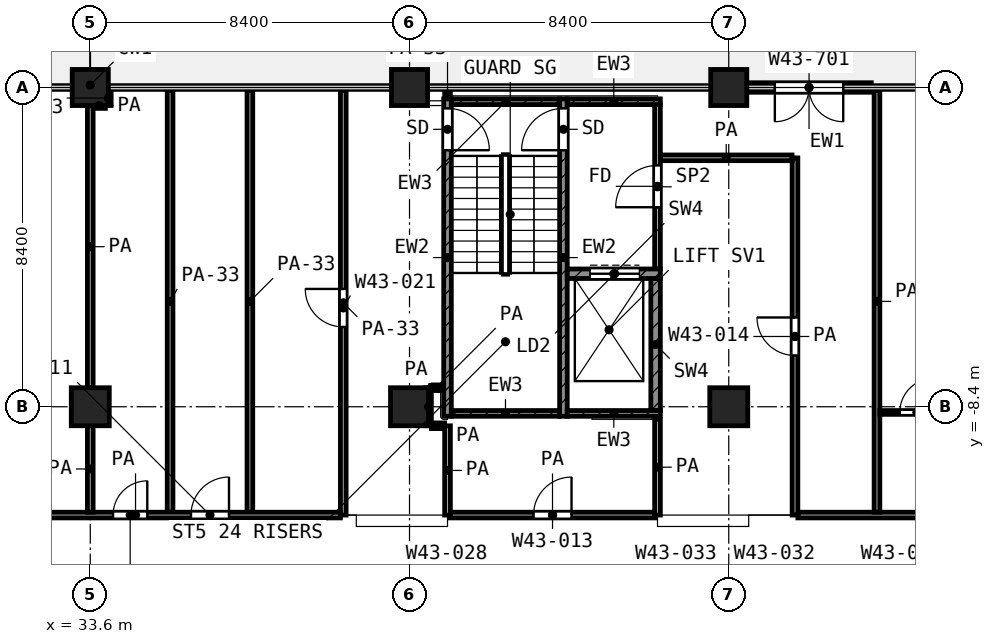
"""IFC4 building model, lengths in metres.
Left out: names, types, materials, properties, quantities, classifications, styles, units other than length and angle.
Written with IfcOpenShell. Run it as: python <this file> out.ifc"""

import sys

from ifc_helpers import new_model, si_unit, direction, frame, frame_2d, origin, origin_2d, place, context, subcontext, project, spatial, rectangle, extrude, element, fill, save


model = new_model("IFC4")
c1 = context("Model", 3, precision=1e-05, world=origin(), true_north=direction((0.0, 1.0)))
c2 = subcontext(c1, "Body", "Model", "MODEL_VIEW")
j1 = project(units=[si_unit("LENGTHUNIT", "METRE"), si_unit("PLANEANGLEUNIT", "RADIAN")], contexts=[c1])
p1 = place(None, origin())
s1 = spatial("IfcSite", under=j1, at=p1, CompositionType="ELEMENT")
p2 = place(p1, origin())
s2 = spatial("IfcBuilding", under=s1, at=p2, CompositionType="ELEMENT")
p3 = place(p2, frame((0.0, 0.0, 187.8)))
s3 = spatial("IfcBuildingStorey", under=s2, at=p3, CompositionType="ELEMENT", Elevation=187.8)
for number, where, z_axis, x_axis in (
    (1, (33.6, 0.0, 0.0), (0.0, 0.0, 1.0), (1.0, 0.0, 0.0)),
    (2, (42.0, 0.0, 0.0), (0.0, 0.0, 1.0), (1.0, 0.0, 0.0)),
    (3, (50.4, 0.0, 0.0), (0.0, 0.0, 1.0), (1.0, 0.0, 0.0)),
):
    element("IfcColumn", number, at=place(p3, frame(where, z_axis=z_axis, x_axis=x_axis)), inside=s3, PredefinedType="COLUMN", context=c2, shape_type="SweptSolid", body=[
        extrude(rectangle(XDim=0.95, YDim=0.95, at=origin_2d()), origin(), (0.0, 0.0, 1.0), 4.2),
    ])
for number, where, z_axis, x_axis in (
    (4, (33.6, -8.4, 0.0), (0.0, 0.0, 1.0), (1.0, 0.0, 0.0)),
    (5, (42.0, -8.4, 0.0), (0.0, 0.0, 1.0), (1.0, 0.0, 0.0)),
    (6, (50.4, -8.4, 0.0), (0.0, 0.0, 1.0), (1.0, 0.0, 0.0)),
):
    element("IfcColumn", number, at=place(p3, frame(where, z_axis=z_axis, x_axis=x_axis)), inside=s3, PredefinedType="COLUMN", context=c2, shape_type="SweptSolid", body=[
        extrude(rectangle(XDim=1.0, YDim=1.0, at=origin_2d()), origin(), (0.0, 0.0, 1.0), 4.2),
    ])
p4 = place(p3, frame((54.15, 0.0, 0.0), z_axis=(0.0, 0.0, 1.0), x_axis=(-1.0, 0.0, 0.0)))
e7 = element("IfcWall", 7, at=p4, inside=s3, PredefinedType="SOLIDWALL", context=c2, shape_type="SweptSolid", body=[
    extrude(rectangle(XDim=3.275, YDim=0.25, at=frame_2d((1.637, 0.0))), origin(), (0.0, 0.0, 1.0), 2.58),
])
p5 = place(p4, frame((0.738, 0.0, 0.0)))
e8 = element("IfcOpeningElement", 8, at=p5, cuts=e7, PredefinedType="OPENING", context=c2, shape_type="SweptSolid", body=[
    extrude(rectangle(XDim=1.8, YDim=2.1, at=frame_2d((0.9, 1.05))), frame((0.0, 0.135, 0.0), z_axis=(0.0, -1.0, 0.0), x_axis=(1.0, 0.0, 0.0)), (0.0, 0.0, 1.0), 0.27),
])
p6 = place(p3, frame((43.0, -8.65, 0.0), z_axis=(0.0, 0.0, 1.0), x_axis=(0.0, 1.0, 0.0)))
e9 = element("IfcWall", 9, at=p6, inside=s3, PredefinedType="SHEAR", context=c2, shape_type="SweptSolid", body=[
    extrude(rectangle(XDim=8.35, YDim=0.2, at=frame_2d((4.175, 0.0))), origin(), (0.0, 0.0, 1.0), 3.6),
])
p7 = place(p6, frame((7.0, 0.0, 0.0)))
e10 = element("IfcOpeningElement", 10, at=p7, cuts=e9, PredefinedType="OPENING", context=c2, shape_type="SweptSolid", body=[
    extrude(rectangle(XDim=1.1, YDim=2.1, at=frame_2d((0.55, 1.05))), frame((0.0, 0.11, 0.0), z_axis=(0.0, -1.0, 0.0), x_axis=(1.0, 0.0, 0.0)), (0.0, 0.0, 1.0), 0.22),
])
p8 = place(p3, frame((46.05, -8.65, 0.0), z_axis=(0.0, 0.0, 1.0), x_axis=(0.0, 1.0, 0.0)))
e11 = element("IfcWall", 11, at=p8, inside=s3, PredefinedType="SHEAR", context=c2, shape_type="SweptSolid", body=[
    extrude(rectangle(XDim=8.35, YDim=0.2, at=frame_2d((4.175, 0.0))), origin(), (0.0, 0.0, 1.0), 3.6),
])
p9 = place(p8, frame((7.0, 0.0, 0.0)))
e12 = element("IfcOpeningElement", 12, at=p9, cuts=e11, PredefinedType="OPENING", context=c2, shape_type="SweptSolid", body=[
    extrude(rectangle(XDim=1.1, YDim=2.1, at=frame_2d((0.55, 1.05))), frame((0.0, 0.11, 0.0), z_axis=(0.0, -1.0, 0.0), x_axis=(1.0, 0.0, 0.0)), (0.0, 0.0, 1.0), 0.22),
])
p10 = place(p3, frame((43.1, -0.375, 0.0), z_axis=(0.0, 0.0, 1.0), x_axis=(1.0, 0.0, 0.0)))
e13 = element("IfcWall", 13, at=p10, inside=s3, PredefinedType="SHEAR", context=c2, shape_type="SweptSolid", body=[
    extrude(rectangle(XDim=2.85, YDim=0.15, at=frame_2d((1.425, 0.0))), origin(), (0.0, 0.0, 1.0), 3.6),
])
p11 = place(p3, frame((46.15, -0.375, 0.0), z_axis=(0.0, 0.0, 1.0), x_axis=(1.0, 0.0, 0.0)))
e14 = element("IfcWall", 14, at=p11, inside=s3, PredefinedType="SHEAR", context=c2, shape_type="SweptSolid", body=[
    extrude(rectangle(XDim=2.45, YDim=0.15, at=frame_2d((1.225, 0.0))), origin(), (0.0, 0.0, 1.0), 3.6),
])
p12 = place(p3, frame((43.1, -8.575, 0.0), z_axis=(0.0, 0.0, 1.0), x_axis=(1.0, 0.0, 0.0)))
e15 = element("IfcWall", 15, at=p12, inside=s3, PredefinedType="SHEAR", context=c2, shape_type="SweptSolid", body=[
    extrude(rectangle(XDim=2.85, YDim=0.15, at=frame_2d((1.425, 0.0))), origin(), (0.0, 0.0, 1.0), 3.6),
])
p13 = place(p3, frame((46.15, -8.575, 0.0), z_axis=(0.0, 0.0, 1.0), x_axis=(1.0, 0.0, 0.0)))
e16 = element("IfcWall", 16, at=p13, inside=s3, PredefinedType="SHEAR", context=c2, shape_type="SweptSolid", body=[
    extrude(rectangle(XDim=2.45, YDim=0.15, at=frame_2d((1.225, 0.0))), origin(), (0.0, 0.0, 1.0), 3.6),
])
p14 = place(p3, frame((46.15, -4.9, 0.0), z_axis=(0.0, 0.0, 1.0), x_axis=(1.0, 0.0, 0.0)))
e17 = element("IfcWall", 17, at=p14, inside=s3, PredefinedType="SHEAR", context=c2, shape_type="SweptSolid", body=[
    extrude(rectangle(XDim=2.45, YDim=0.25, at=frame_2d((1.225, 0.0))), origin(), (0.0, 0.0, 1.0), 3.6),
])
p15 = place(p14, frame((0.6, 0.0, 0.0)))
e18 = element("IfcOpeningElement", 18, at=p15, cuts=e17, PredefinedType="OPENING", context=c2, shape_type="SweptSolid", body=[
    extrude(rectangle(XDim=1.3, YDim=2.1, at=frame_2d((0.65, 1.05))), frame((0.0, 0.135, 0.0), z_axis=(0.0, -1.0, 0.0), x_axis=(1.0, 0.0, 0.0)), (0.0, 0.0, 1.0), 0.27),
])
p16 = place(p3, frame((48.475, -8.5, 0.0), z_axis=(0.0, 0.0, 1.0), x_axis=(0.0, 1.0, 0.0)))
e19 = element("IfcWall", 19, at=p16, inside=s3, PredefinedType="SHEAR", context=c2, shape_type="SweptSolid", body=[
    extrude(rectangle(XDim=3.475, YDim=0.25, at=frame_2d((1.738, 0.0))), origin(), (0.0, 0.0, 1.0), 3.6),
])
p17 = place(p3, frame((48.525, -4.775, 0.0), z_axis=(0.0, 0.0, 1.0), x_axis=(0.0, 1.0, 0.0)))
e20 = element("IfcWall", 20, at=p17, inside=s3, PredefinedType="PARTITIONING", context=c2, shape_type="SweptSolid", body=[
    extrude(rectangle(XDim=4.325, YDim=0.15, at=frame_2d((2.163, 0.0))), origin(), (0.0, 0.0, 1.0), 3.6),
])
p18 = place(p17, frame((1.625, 0.0, 0.0)))
e21 = element("IfcOpeningElement", 21, at=p18, cuts=e20, PredefinedType="OPENING", context=c2, shape_type="SweptSolid", body=[
    extrude(rectangle(XDim=1.1, YDim=2.1, at=frame_2d((0.55, 1.05))), frame((0.0, 0.085, 0.0), z_axis=(0.0, -1.0, 0.0), x_axis=(1.0, 0.0, 0.0)), (0.0, 0.0, 1.0), 0.17),
])
p19 = place(p3, frame((54.375, -8.55, 0.0), z_axis=(0.0, 0.0, 1.0), x_axis=(1.0, 0.0, 0.0)))
e22 = element("IfcWall", 22, at=p19, inside=s3, PredefinedType="PARTITIONING", context=c2, shape_type="SweptSolid", body=[
    extrude(rectangle(XDim=1.975, YDim=0.1, at=frame_2d((0.988, 0.0))), origin(), (0.0, 0.0, 1.0), 3.6),
])
p20 = place(p19, frame((0.525, 0.0, 0.0)))
e23 = element("IfcOpeningElement", 23, at=p20, cuts=e22, PredefinedType="OPENING", context=c2, shape_type="SweptSolid", body=[
    extrude(rectangle(XDim=0.9, YDim=2.1, at=frame_2d((0.45, 1.05))), frame((0.0, 0.06, 0.0), z_axis=(0.0, -1.0, 0.0), x_axis=(1.0, 0.0, 0.0)), (0.0, 0.0, 1.0), 0.12),
])
p21 = place(p3, frame((29.4, -11.25, 0.0), z_axis=(0.0, 0.0, 1.0), x_axis=(1.0, 0.0, 0.0)))
e24 = element("IfcWall", 24, at=p21, inside=s3, PredefinedType="PARTITIONING", context=c2, shape_type="SweptSolid", body=[
    extrude(rectangle(XDim=10.782, YDim=0.15, at=frame_2d((5.391, 0.0))), origin(), (0.0, 0.0, 1.0), 3.6),
])
p22 = place(p21, frame((1.6, 0.0, 0.0)))
e25 = element("IfcOpeningElement", 25, at=p22, cuts=e24, PredefinedType="OPENING", context=c2, shape_type="SweptSolid", body=[
    extrude(rectangle(XDim=1.0, YDim=2.1, at=frame_2d((0.5, 1.05))), frame((0.0, 0.085, 0.0), z_axis=(0.0, -1.0, 0.0), x_axis=(1.0, 0.0, 0.0)), (0.0, 0.0, 1.0), 0.17),
])
p23 = place(p21, frame((4.8, 0.0, 0.0)))
e26 = element("IfcOpeningElement", 26, at=p23, cuts=e24, PredefinedType="OPENING", context=c2, shape_type="SweptSolid", body=[
    extrude(rectangle(XDim=0.9, YDim=2.1, at=frame_2d((0.45, 1.05))), frame((0.0, 0.085, 0.0), z_axis=(0.0, -1.0, 0.0), x_axis=(1.0, 0.0, 0.0)), (0.0, 0.0, 1.0), 0.17),
])
p24 = place(p21, frame((6.85, 0.0, 0.0)))
e27 = element("IfcOpeningElement", 27, at=p24, cuts=e24, PredefinedType="OPENING", context=c2, shape_type="SweptSolid", body=[
    extrude(rectangle(XDim=1.0, YDim=2.1, at=frame_2d((0.5, 1.05))), frame((0.0, 0.085, 0.0), z_axis=(0.0, -1.0, 0.0), x_axis=(1.0, 0.0, 0.0)), (0.0, 0.0, 1.0), 0.17),
])
p25 = place(p3, frame((43.075, -11.25, 0.0), z_axis=(0.0, 0.0, 1.0), x_axis=(1.0, 0.0, 0.0)))
e28 = element("IfcWall", 28, at=p25, inside=s3, PredefinedType="PARTITIONING", context=c2, shape_type="SweptSolid", body=[
    extrude(rectangle(XDim=5.375, YDim=0.15, at=frame_2d((2.688, 0.0))), origin(), (0.0, 0.0, 1.0), 3.6),
])
p26 = place(p25, frame((2.188, 0.0, 0.0)))
e29 = element("IfcOpeningElement", 29, at=p26, cuts=e28, PredefinedType="OPENING", context=c2, shape_type="SweptSolid", body=[
    extrude(rectangle(XDim=1.0, YDim=2.1, at=frame_2d((0.5, 1.05))), frame((0.0, 0.085, 0.0), z_axis=(0.0, -1.0, 0.0), x_axis=(1.0, 0.0, 0.0)), (0.0, 0.0, 1.0), 0.17),
])
p27 = place(p3, frame((52.218, -11.25, 0.0), z_axis=(0.0, 0.0, 1.0), x_axis=(1.0, 0.0, 0.0)))
e30 = element("IfcWall", 30, at=p27, inside=s3, PredefinedType="PARTITIONING", context=c2, shape_type="SweptSolid", body=[
    extrude(rectangle(XDim=14.902, YDim=0.15, at=frame_2d((7.451, 0.0))), origin(), (0.0, 0.0, 1.0), 3.6),
])
p28 = place(p27, frame((4.782, 0.0, 0.0)))
e31 = element("IfcOpeningElement", 31, at=p28, cuts=e30, PredefinedType="OPENING", context=c2, shape_type="SweptSolid", body=[
    extrude(rectangle(XDim=1.2, YDim=2.1, at=frame_2d((0.6, 1.05))), frame((0.0, 0.085, 0.0), z_axis=(0.0, -1.0, 0.0), x_axis=(1.0, 0.0, 0.0)), (0.0, 0.0, 1.0), 0.17),
])
p29 = place(p27, frame((6.382, 0.0, 0.0)))
e32 = element("IfcOpeningElement", 32, at=p29, cuts=e30, PredefinedType="OPENING", context=c2, shape_type="SweptSolid", body=[
    extrude(rectangle(XDim=1.2, YDim=2.1, at=frame_2d((0.6, 1.05))), frame((0.0, 0.085, 0.0), z_axis=(0.0, -1.0, 0.0), x_axis=(1.0, 0.0, 0.0)), (0.0, 0.0, 1.0), 0.17),
])
p30 = place(p27, frame((9.432, 0.0, 0.0)))
e33 = element("IfcOpeningElement", 33, at=p30, cuts=e30, PredefinedType="OPENING", context=c2, shape_type="SweptSolid", body=[
    extrude(rectangle(XDim=1.2, YDim=2.1, at=frame_2d((0.6, 1.05))), frame((0.0, 0.085, 0.0), z_axis=(0.0, -1.0, 0.0), x_axis=(1.0, 0.0, 0.0)), (0.0, 0.0, 1.0), 0.17),
])
p31 = place(p27, frame((12.532, 0.0, 0.0)))
e34 = element("IfcOpeningElement", 34, at=p31, cuts=e30, PredefinedType="OPENING", context=c2, shape_type="SweptSolid", body=[
    extrude(rectangle(XDim=1.0, YDim=2.1, at=frame_2d((0.5, 1.05))), frame((0.0, 0.085, 0.0), z_axis=(0.0, -1.0, 0.0), x_axis=(1.0, 0.0, 0.0)), (0.0, 0.0, 1.0), 0.17),
])
p32 = place(p3, frame((42.577, -8.9, 0.0), z_axis=(0.0, 0.0, 1.0), x_axis=(1.0, 0.0, 0.0)))
e35 = element("IfcWall", 35, at=p32, inside=s3, PredefinedType="PARTITIONING", context=c2, shape_type="SweptSolid", body=[
    extrude(rectangle(XDim=0.346, YDim=0.15, at=frame_2d((0.173, 0.0))), origin(), (0.0, 0.0, 1.0), 3.6),
])
p33 = place(p3, frame((42.577, -7.9, 0.0), z_axis=(0.0, 0.0, 1.0), x_axis=(1.0, 0.0, 0.0)))
e36 = element("IfcWall", 36, at=p33, inside=s3, PredefinedType="PARTITIONING", context=c2, shape_type="SweptSolid", body=[
    extrude(rectangle(XDim=0.243, YDim=0.15, at=frame_2d((0.122, 0.0))), origin(), (0.0, 0.0, 1.0), 3.6),
])
p34 = place(p3, frame((48.6, -1.85, 0.0), z_axis=(0.0, 0.0, 1.0), x_axis=(1.0, 0.0, 0.0)))
e37 = element("IfcWall", 37, at=p34, inside=s3, PredefinedType="PARTITIONING", context=c2, shape_type="SweptSolid", body=[
    extrude(rectangle(XDim=3.466, YDim=0.15, at=frame_2d((1.733, 0.0))), origin(), (0.0, 0.0, 1.0), 3.6),
])
p35 = place(p3, frame((33.677, -0.475, 0.0), z_axis=(0.0, 0.0, 1.0), x_axis=(1.0, 0.0, 0.0)))
e38 = element("IfcWall", 38, at=p35, inside=s3, PredefinedType="PARTITIONING", context=c2, shape_type="SweptSolid", body=[
    extrude(rectangle(XDim=0.321, YDim=0.15, at=frame_2d((0.161, 0.0))), origin(), (0.0, 0.0, 1.0), 3.6),
])
p36 = place(p3, frame((33.6, -11.175, 0.0), z_axis=(0.0, 0.0, 1.0), x_axis=(0.0, 1.0, 0.0)))
e39 = element("IfcWall", 39, at=p36, inside=s3, PredefinedType="PARTITIONING", context=c2, shape_type="SweptSolid", body=[
    extrude(rectangle(XDim=2.275, YDim=0.15, at=frame_2d((1.138, 0.0))), origin(), (0.0, 0.0, 1.0), 3.6),
])
p37 = place(p3, frame((33.6, -7.9, 0.0), z_axis=(0.0, 0.0, 1.0), x_axis=(0.0, 1.0, 0.0)))
e40 = element("IfcWall", 40, at=p37, inside=s3, PredefinedType="PARTITIONING", context=c2, shape_type="SweptSolid", body=[
    extrude(rectangle(XDim=7.423, YDim=0.15, at=frame_2d((3.711, 0.0))), origin(), (0.0, 0.0, 1.0), 3.6),
])
p38 = place(p3, frame((34.075, -0.473, 0.0), z_axis=(0.0, 0.0, 1.0), x_axis=(0.0, 1.0, 0.0)))
e41 = element("IfcWall", 41, at=p38, inside=s3, PredefinedType="PARTITIONING", context=c2, shape_type="SweptSolid", body=[
    extrude(rectangle(XDim=0.393, YDim=0.15, at=frame_2d((0.196, 0.0))), origin(), (0.0, 0.0, 1.0), 2.7),
])
for number, where, z_axis, x_axis in (
    (42, (35.7, -11.175, 0.0), (0.0, 0.0, 1.0), (0.0, 1.0, 0.0)),
    (43, (37.8, -11.175, 0.0), (0.0, 0.0, 1.0), (0.0, 1.0, 0.0)),
):
    element("IfcWall", number, at=place(p3, frame(where, z_axis=z_axis, x_axis=x_axis)), inside=s3, PredefinedType="PARTITIONING", context=c2, shape_type="SweptSolid", body=[
        extrude(rectangle(XDim=11.095, YDim=0.15, at=frame_2d((5.547, 0.0))), origin(), (0.0, 0.0, 1.0), 2.7),
    ])
p39 = place(p3, frame((40.257, -11.25, 0.0), z_axis=(0.0, 0.0, 1.0), x_axis=(0.0, 1.0, 0.0)))
e44 = element("IfcWall", 44, at=p39, inside=s3, PredefinedType="PARTITIONING", context=c2, shape_type="SweptSolid", body=[
    extrude(rectangle(XDim=11.17, YDim=0.15, at=frame_2d((5.585, 0.0))), origin(), (0.0, 0.0, 1.0), 2.7),
])
p40 = place(p39, frame((4.95, 0.0, 0.0)))
e45 = element("IfcOpeningElement", 45, at=p40, cuts=e44, PredefinedType="OPENING", context=c2, shape_type="SweptSolid", body=[
    extrude(rectangle(XDim=1.0, YDim=2.1, at=frame_2d((0.5, 1.05))), frame((0.0, 0.085, 0.0), z_axis=(0.0, -1.0, 0.0), x_axis=(1.0, 0.0, 0.0)), (0.0, 0.0, 1.0), 0.17),
])
p41 = place(p3, frame((42.5, -8.899, 0.0), z_axis=(0.0, 0.0, 1.0), x_axis=(0.0, 1.0, 0.0)))
e46 = element("IfcWall", 46, at=p41, inside=s3, PredefinedType="PARTITIONING", context=c2, shape_type="SweptSolid", body=[
    extrude(rectangle(XDim=0.997, YDim=0.15, at=frame_2d((0.499, 0.0))), origin(), (0.0, 0.0, 1.0), 3.6),
])
p42 = place(p3, frame((43.0, -11.25, 0.0), z_axis=(0.0, 0.0, 1.0), x_axis=(0.0, 1.0, 0.0)))
e47 = element("IfcWall", 47, at=p42, inside=s3, PredefinedType="PARTITIONING", context=c2, shape_type="SweptSolid", body=[
    extrude(rectangle(XDim=2.348, YDim=0.15, at=frame_2d((1.174, 0.0))), origin(), (0.0, 0.0, 1.0), 3.6),
])
p43 = place(p3, frame((43.0, -0.27, 0.0), z_axis=(0.0, 0.0, 1.0), x_axis=(0.0, 1.0, 0.0)))
e48 = element("IfcWall", 48, at=p43, inside=s3, PredefinedType="PARTITIONING", context=c2, shape_type="SweptSolid", body=[
    extrude(rectangle(XDim=0.19, YDim=0.15, at=frame_2d((0.095, 0.0))), origin(), (0.0, 0.0, 1.0), 2.7),
])
p44 = place(p3, frame((48.525, -11.25, 0.0), z_axis=(0.0, 0.0, 1.0), x_axis=(0.0, 1.0, 0.0)))
e49 = element("IfcWall", 49, at=p44, inside=s3, PredefinedType="PARTITIONING", context=c2, shape_type="SweptSolid", body=[
    extrude(rectangle(XDim=2.52, YDim=0.15, at=frame_2d((1.26, 0.0))), origin(), (0.0, 0.0, 1.0), 3.6),
])
p45 = place(p3, frame((52.143, -11.25, 0.0), z_axis=(0.0, 0.0, 1.0), x_axis=(0.0, 1.0, 0.0)))
e50 = element("IfcWall", 50, at=p45, inside=s3, PredefinedType="PARTITIONING", context=c2, shape_type="SweptSolid", body=[
    extrude(rectangle(XDim=9.398, YDim=0.15, at=frame_2d((4.699, 0.0))), origin(), (0.0, 0.0, 1.0), 3.6),
])
p46 = place(p45, frame((4.199, 0.0, 0.0)))
e51 = element("IfcOpeningElement", 51, at=p46, cuts=e50, PredefinedType="OPENING", context=c2, shape_type="SweptSolid", body=[
    extrude(rectangle(XDim=1.0, YDim=2.1, at=frame_2d((0.5, 1.05))), frame((0.0, 0.085, 0.0), z_axis=(0.0, -1.0, 0.0), x_axis=(1.0, 0.0, 0.0)), (0.0, 0.0, 1.0), 0.17),
])
p47 = place(p3, frame((54.3, -11.175, 0.0), z_axis=(0.0, 0.0, 1.0), x_axis=(0.0, 1.0, 0.0)))
e52 = element("IfcWall", 52, at=p47, inside=s3, PredefinedType="PARTITIONING", context=c2, shape_type="SweptSolid", body=[
    extrude(rectangle(XDim=11.095, YDim=0.15, at=frame_2d((5.547, 0.0))), origin(), (0.0, 0.0, 1.0), 2.7),
])
p48 = place(p5, origin())
e53 = element("IfcDoor", 53, at=p48, inside=s3, OperationType="DOUBLE_DOOR_SINGLE_SWING", PredefinedType="DOOR", context=c2, shape_type="SweptSolid", body=[
    extrude(rectangle(XDim=1.8, YDim=2.1, at=frame_2d((0.9, 1.05))), frame((0.0, 0.025, 0.0), z_axis=(0.0, -1.0, 0.0), x_axis=(1.0, 0.0, 0.0)), (0.0, 0.0, 1.0), 0.05),
])
fill(e8, e53)
p49 = place(p7, frame((1.1, 0.0, 0.0), z_axis=(0.0, 0.0, 1.0), x_axis=(-1.0, 0.0, 0.0)))
e54 = element("IfcDoor", 54, at=p49, inside=s3, OperationType="SINGLE_SWING_LEFT", PredefinedType="DOOR", context=c2, shape_type="SweptSolid", body=[
    extrude(rectangle(XDim=1.1, YDim=2.1, at=frame_2d((0.55, 1.05))), frame((0.0, 0.025, 0.0), z_axis=(0.0, -1.0, 0.0), x_axis=(1.0, 0.0, 0.0)), (0.0, 0.0, 1.0), 0.05),
])
fill(e10, e54)
p50 = place(p9, origin())
e55 = element("IfcDoor", 55, at=p50, inside=s3, OperationType="SINGLE_SWING_LEFT", PredefinedType="DOOR", context=c2, shape_type="SweptSolid", body=[
    extrude(rectangle(XDim=1.1, YDim=2.1, at=frame_2d((0.55, 1.05))), frame((0.0, 0.025, 0.0), z_axis=(0.0, -1.0, 0.0), x_axis=(1.0, 0.0, 0.0)), (0.0, 0.0, 1.0), 0.05),
])
fill(e12, e55)
p51 = place(p15, origin())
e56 = element("IfcDoor", 56, at=p51, inside=s3, OperationType="DOUBLE_DOOR_SLIDING", PredefinedType="DOOR", context=c2, shape_type="SweptSolid", body=[
    extrude(rectangle(XDim=1.3, YDim=2.1, at=frame_2d((0.65, 1.05))), frame((0.0, 0.025, 0.0), z_axis=(0.0, -1.0, 0.0), x_axis=(1.0, 0.0, 0.0)), (0.0, 0.0, 1.0), 0.05),
])
fill(e18, e56)
p52 = place(p18, origin())
e57 = element("IfcDoor", 57, at=p52, inside=s3, OperationType="SINGLE_SWING_LEFT", PredefinedType="DOOR", context=c2, shape_type="SweptSolid", body=[
    extrude(rectangle(XDim=1.1, YDim=2.1, at=frame_2d((0.55, 1.05))), frame((0.0, 0.025, 0.0), z_axis=(0.0, -1.0, 0.0), x_axis=(1.0, 0.0, 0.0)), (0.0, 0.0, 1.0), 0.05),
])
fill(e21, e57)
p53 = place(p26, origin())
e58 = element("IfcDoor", 58, at=p53, inside=s3, OperationType="SINGLE_SWING_RIGHT", PredefinedType="DOOR", context=c2, shape_type="SweptSolid", body=[
    extrude(rectangle(XDim=1.0, YDim=2.1, at=frame_2d((0.5, 1.05))), frame((0.0, 0.025, 0.0), z_axis=(0.0, -1.0, 0.0), x_axis=(1.0, 0.0, 0.0)), (0.0, 0.0, 1.0), 0.05),
])
fill(e29, e58)
p54 = place(p46, origin())
e59 = element("IfcDoor", 59, at=p54, inside=s3, OperationType="SINGLE_SWING_RIGHT", PredefinedType="DOOR", context=c2, shape_type="SweptSolid", body=[
    extrude(rectangle(XDim=1.0, YDim=2.1, at=frame_2d((0.5, 1.05))), frame((0.0, 0.025, 0.0), z_axis=(0.0, -1.0, 0.0), x_axis=(1.0, 0.0, 0.0)), (0.0, 0.0, 1.0), 0.05),
])
fill(e51, e59)
p55 = place(p20, origin())
e60 = element("IfcDoor", 60, at=p55, inside=s3, OperationType="SINGLE_SWING_RIGHT", PredefinedType="DOOR", context=c2, shape_type="SweptSolid", body=[
    extrude(rectangle(XDim=0.9, YDim=2.1, at=frame_2d((0.45, 1.05))), frame((0.0, 0.025, 0.0), z_axis=(0.0, -1.0, 0.0), x_axis=(1.0, 0.0, 0.0)), (0.0, 0.0, 1.0), 0.05),
])
fill(e23, e60)
p56 = place(p23, origin())
e61 = element("IfcDoor", 61, at=p56, inside=s3, OperationType="SINGLE_SWING_RIGHT", PredefinedType="DOOR", context=c2, shape_type="SweptSolid", body=[
    extrude(rectangle(XDim=0.9, YDim=2.1, at=frame_2d((0.45, 1.05))), frame((0.0, 0.025, 0.0), z_axis=(0.0, -1.0, 0.0), x_axis=(1.0, 0.0, 0.0)), (0.0, 0.0, 1.0), 0.05),
])
fill(e26, e61)
p57 = place(p24, origin())
e62 = element("IfcDoor", 62, at=p57, inside=s3, OperationType="SINGLE_SWING_RIGHT", PredefinedType="DOOR", context=c2, shape_type="SweptSolid", body=[
    extrude(rectangle(XDim=1.0, YDim=2.1, at=frame_2d((0.5, 1.05))), frame((0.0, 0.025, 0.0), z_axis=(0.0, -1.0, 0.0), x_axis=(1.0, 0.0, 0.0)), (0.0, 0.0, 1.0), 0.05),
])
fill(e27, e62)
p58 = place(p40, origin())
e63 = element("IfcDoor", 63, at=p58, inside=s3, OperationType="SINGLE_SWING_RIGHT", PredefinedType="DOOR", context=c2, shape_type="SweptSolid", body=[
    extrude(rectangle(XDim=1.0, YDim=2.1, at=frame_2d((0.5, 1.05))), frame((0.0, 0.025, 0.0), z_axis=(0.0, -1.0, 0.0), x_axis=(1.0, 0.0, 0.0)), (0.0, 0.0, 1.0), 0.05),
])
fill(e45, e63)
save(model, sys.argv[1])
